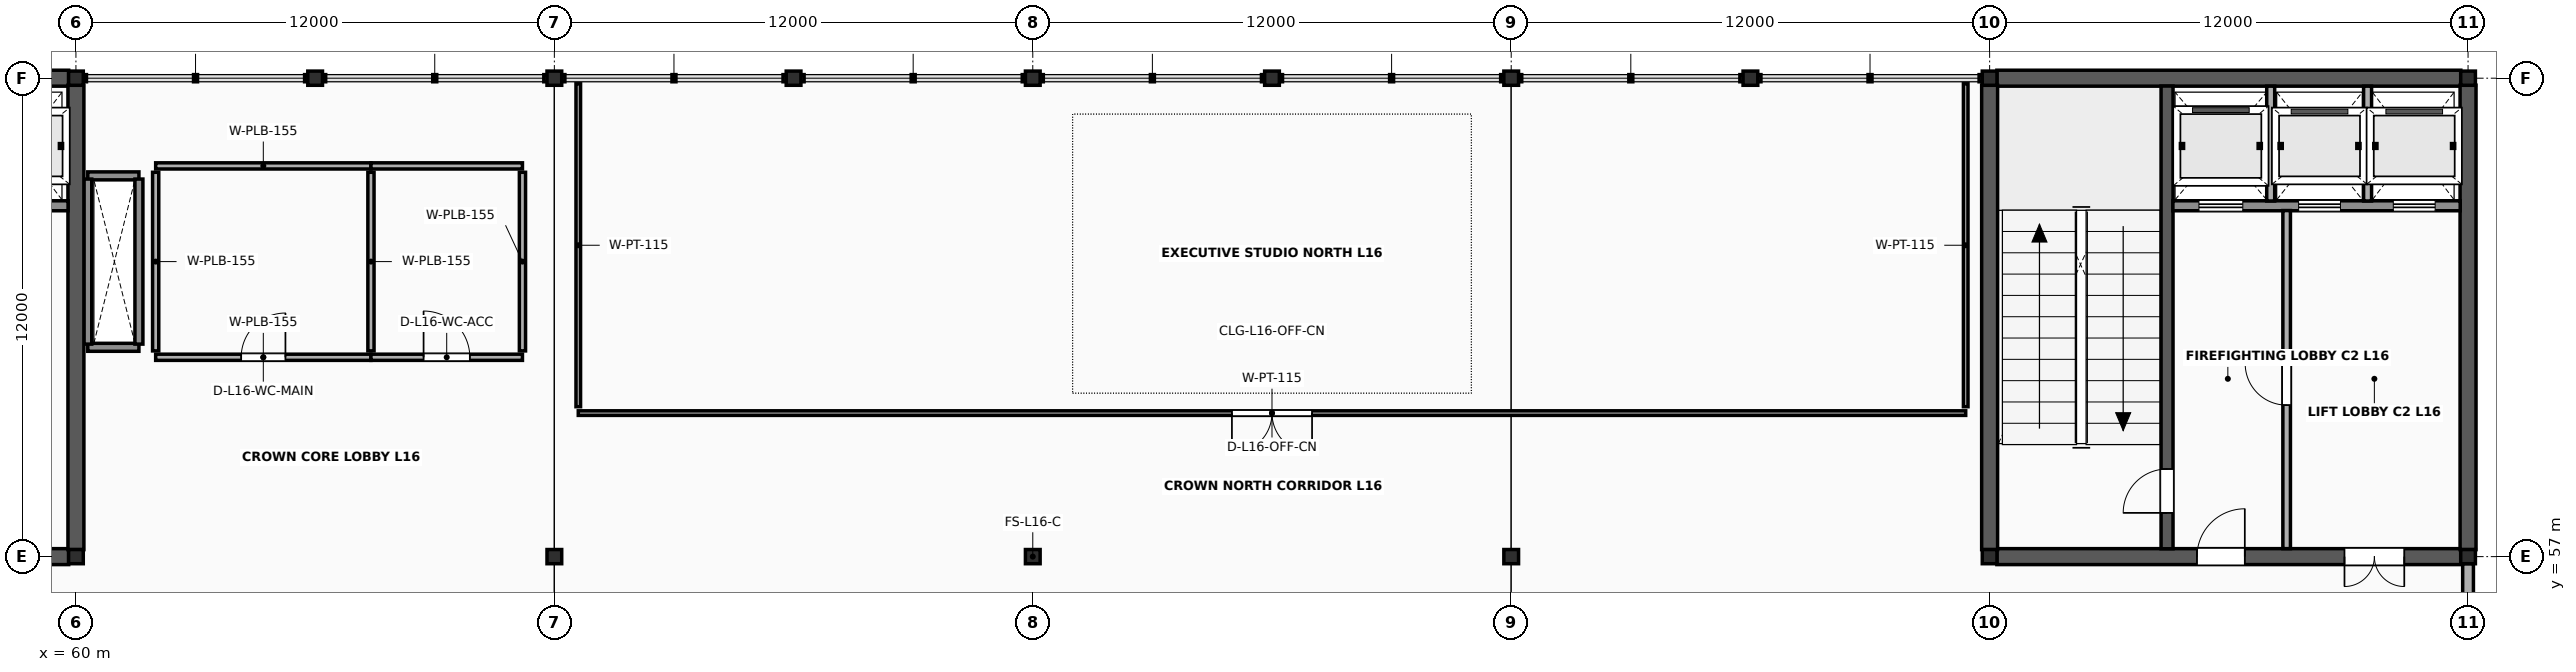
"""IFC4 building model, lengths in metres.
Left out: names, types, materials, properties, quantities, classifications, styles, units other than length and angle.
Written with IfcOpenShell. Run it as: python <this file> out.ifc"""

import sys

from ifc_helpers import new_model, si_unit, direction, frame, frame_2d, origin, origin_2d, place, context, subcontext, project, spatial, rectangle, i_section, extrude, element, fill, save


model = new_model("IFC4")
c1 = context("Model", 3, precision=1e-05, world=origin(), true_north=direction((0.0, 1.0)))
c2 = subcontext(c1, "Body", "Model", "MODEL_VIEW")
j1 = project(units=[si_unit("LENGTHUNIT", "METRE"), si_unit("PLANEANGLEUNIT", "RADIAN")], contexts=[c1])
p1 = place(None, origin())
s1 = spatial("IfcSite", under=j1, at=p1, CompositionType="ELEMENT")
p2 = place(p1, origin())
s2 = spatial("IfcBuilding", under=s1, at=p2, CompositionType="ELEMENT")
p3 = place(p2, frame((0.0, 0.0, 65.6)))
s3 = spatial("IfcBuildingStorey", under=s2, at=p3, CompositionType="ELEMENT", Elevation=65.6)
for number, where, z_axis, x_axis in (
    (1, (60.0, 57.0, 0.0), (0.0, 0.0, 1.0), (1.0, 0.0, 0.0)),
    (2, (60.0, 69.0, 0.0), (0.0, 0.0, 1.0), (1.0, 0.0, 0.0)),
    (3, (72.0, 57.0, 0.0), (0.0, 0.0, 1.0), (1.0, 0.0, 0.0)),
    (4, (72.0, 69.0, 0.0), (0.0, 0.0, 1.0), (1.0, 0.0, 0.0)),
    (5, (84.0, 57.0, 0.0), (0.0, 0.0, 1.0), (1.0, 0.0, 0.0)),
    (6, (84.0, 69.0, 0.0), (0.0, 0.0, 1.0), (1.0, 0.0, 0.0)),
    (7, (96.0, 57.0, 0.0), (0.0, 0.0, 1.0), (1.0, 0.0, 0.0)),
    (8, (96.0, 69.0, 0.0), (0.0, 0.0, 1.0), (1.0, 0.0, 0.0)),
    (9, (108.0, 57.0, 0.0), (0.0, 0.0, 1.0), (1.0, 0.0, 0.0)),
    (10, (108.0, 69.0, 0.0), (0.0, 0.0, 1.0), (1.0, 0.0, 0.0)),
    (11, (120.0, 57.0, 0.0), (0.0, 0.0, 1.0), (1.0, 0.0, 0.0)),
    (12, (120.0, 69.0, 0.0), (0.0, 0.0, 1.0), (1.0, 0.0, 0.0)),
    (13, (66.0, 69.0, 0.0), (0.0, 0.0, 1.0), (1.0, 0.0, 0.0)),
    (14, (78.0, 69.0, 0.0), (0.0, 0.0, 1.0), (1.0, 0.0, 0.0)),
    (15, (90.0, 69.0, 0.0), (0.0, 0.0, 1.0), (1.0, 0.0, 0.0)),
    (16, (102.0, 69.0, 0.0), (0.0, 0.0, 1.0), (1.0, 0.0, 0.0)),
):
    element("IfcColumn", number, at=place(p3, frame(where, z_axis=z_axis, x_axis=x_axis)), inside=s3, PredefinedType="COLUMN", context=c2, shape_type="SweptSolid", body=[
        extrude(i_section(OverallWidth=0.369, OverallDepth=0.356, WebThickness=0.011, FlangeThickness=0.018, FilletRadius=0.018, at=origin_2d()), origin(), (0.0, 0.0, 1.0), 4.0),
    ])
for number, where, z_axis, x_axis in (
    (17, (60.297, 62.25, 0.0), (0.0, 0.0, 1.0), (1.0, 0.0, 0.0)),
    (18, (60.297, 66.55, 0.0), (0.0, 0.0, 1.0), (1.0, 0.0, 0.0)),
):
    element("IfcWall", number, at=place(p3, frame(where, z_axis=z_axis, x_axis=x_axis)), inside=s3, PredefinedType="SOLIDWALL", context=c2, shape_type="SweptSolid", body=[
        extrude(rectangle(XDim=1.283, YDim=0.2, at=frame_2d((0.642, 0.0))), origin(), (0.0, 0.0, 1.0), 3.793),
    ])
for number, where, z_axis, x_axis in (
    (19, (60.297, 62.33, 0.0), (0.0, 0.0, 1.0), (0.0, 1.0, 0.0)),
    (20, (61.58, 62.33, 0.0), (0.0, 0.0, 1.0), (0.0, 1.0, 0.0)),
):
    element("IfcWall", number, at=place(p3, frame(where, z_axis=z_axis, x_axis=x_axis)), inside=s3, PredefinedType="SOLIDWALL", context=c2, shape_type="SweptSolid", body=[
        extrude(rectangle(XDim=4.14, YDim=0.2, at=frame_2d((2.07, 0.0))), origin(), (0.0, 0.0, 1.0), 3.793),
    ])
p4 = place(p3, frame((48.181, 57.0, 0.0), z_axis=(0.0, 0.0, 1.0), x_axis=(1.0, 0.0, 0.0)))
e21 = element("IfcWall", 21, at=p4, inside=s3, PredefinedType="SHEAR", context=c2, shape_type="SweptSolid", body=[
    extrude(rectangle(XDim=11.637, YDim=0.4, at=frame_2d((5.819, 0.0))), origin(), (0.0, 0.0, 1.0), 3.793),
])
p5 = place(p4, frame((5.019, 0.0, 0.0)))
e22 = element("IfcOpeningElement", 22, at=p5, cuts=e21, PredefinedType="OPENING", context=c2, shape_type="SweptSolid", body=[
    extrude(rectangle(XDim=1.2, YDim=2.2, at=frame_2d((0.6, 1.1))), frame((0.0, 0.215, 0.0), z_axis=(0.0, -1.0, 0.0), x_axis=(1.0, 0.0, 0.0)), (0.0, 0.0, 1.0), 0.43),
])
p6 = place(p4, frame((8.718, 0.0, 0.0)))
e23 = element("IfcOpeningElement", 23, at=p6, cuts=e21, PredefinedType="OPENING", context=c2, shape_type="SweptSolid", body=[
    extrude(rectangle(XDim=1.5, YDim=2.25, at=frame_2d((0.75, 1.125))), frame((0.0, 0.215, 0.0), z_axis=(0.0, -1.0, 0.0), x_axis=(1.0, 0.0, 0.0)), (0.0, 0.0, 1.0), 0.43),
])
p7 = place(p3, frame((48.181, 69.0, 0.0), z_axis=(0.0, 0.0, 1.0), x_axis=(1.0, 0.0, 0.0)))
e24 = element("IfcWall", 24, at=p7, inside=s3, PredefinedType="SHEAR", context=c2, shape_type="SweptSolid", body=[
    extrude(rectangle(XDim=11.637, YDim=0.4, at=frame_2d((5.819, 0.0))), origin(), (0.0, 0.0, 1.0), 3.793),
])
p8 = place(p3, frame((60.0, 57.175, 0.0), z_axis=(0.0, 0.0, 1.0), x_axis=(0.0, 1.0, 0.0)))
e25 = element("IfcWall", 25, at=p8, inside=s3, PredefinedType="SHEAR", context=c2, shape_type="SweptSolid", body=[
    extrude(rectangle(XDim=11.65, YDim=0.4, at=frame_2d((5.825, 0.0))), origin(), (0.0, 0.0, 1.0), 3.793),
])
p9 = place(p3, frame((52.597, 65.8, 0.0), z_axis=(0.0, 0.0, 1.0), x_axis=(1.0, 0.0, 0.0)))
e26 = element("IfcWall", 26, at=p9, inside=s3, PredefinedType="SOLIDWALL", context=c2, shape_type="SweptSolid", body=[
    extrude(rectangle(XDim=7.206, YDim=0.25, at=frame_2d((3.603, 0.0))), origin(), (0.0, 0.0, 1.0), 3.793),
])
p10 = place(p9, frame((0.653, 0.0, 0.0)))
e27 = element("IfcOpeningElement", 27, at=p10, cuts=e26, PredefinedType="OPENING", context=c2, shape_type="SweptSolid", body=[
    extrude(rectangle(XDim=1.1, YDim=2.24, at=frame_2d((0.55, 1.12))), frame((0.0, 0.14, 0.0), z_axis=(0.0, -1.0, 0.0), x_axis=(1.0, 0.0, 0.0)), (0.0, 0.0, 1.0), 0.28),
])
p11 = place(p9, frame((3.153, 0.0, 0.0)))
e28 = element("IfcOpeningElement", 28, at=p11, cuts=e26, PredefinedType="OPENING", context=c2, shape_type="SweptSolid", body=[
    extrude(rectangle(XDim=1.05, YDim=2.2, at=frame_2d((0.525, 1.1))), frame((0.0, 0.14, 0.0), z_axis=(0.0, -1.0, 0.0), x_axis=(1.0, 0.0, 0.0)), (0.0, 0.0, 1.0), 0.28),
])
p12 = place(p9, frame((5.528, 0.0, 0.0)))
e29 = element("IfcOpeningElement", 29, at=p12, cuts=e26, PredefinedType="OPENING", context=c2, shape_type="SweptSolid", body=[
    extrude(rectangle(XDim=1.05, YDim=2.2, at=frame_2d((0.525, 1.1))), frame((0.0, 0.14, 0.0), z_axis=(0.0, -1.0, 0.0), x_axis=(1.0, 0.0, 0.0)), (0.0, 0.0, 1.0), 0.28),
])
p13 = place(p3, frame((108.181, 57.0, 0.0), z_axis=(0.0, 0.0, 1.0), x_axis=(1.0, 0.0, 0.0)))
e30 = element("IfcWall", 30, at=p13, inside=s3, PredefinedType="SHEAR", context=c2, shape_type="SweptSolid", body=[
    extrude(rectangle(XDim=11.637, YDim=0.4, at=frame_2d((5.819, 0.0))), origin(), (0.0, 0.0, 1.0), 3.793),
])
p14 = place(p13, frame((5.019, 0.0, 0.0)))
e31 = element("IfcOpeningElement", 31, at=p14, cuts=e30, PredefinedType="OPENING", context=c2, shape_type="SweptSolid", body=[
    extrude(rectangle(XDim=1.2, YDim=2.2, at=frame_2d((0.6, 1.1))), frame((0.0, 0.215, 0.0), z_axis=(0.0, -1.0, 0.0), x_axis=(1.0, 0.0, 0.0)), (0.0, 0.0, 1.0), 0.43),
])
p15 = place(p13, frame((8.719, 0.0, 0.0)))
e32 = element("IfcOpeningElement", 32, at=p15, cuts=e30, PredefinedType="OPENING", context=c2, shape_type="SweptSolid", body=[
    extrude(rectangle(XDim=1.5, YDim=2.25, at=frame_2d((0.75, 1.125))), frame((0.0, 0.215, 0.0), z_axis=(0.0, -1.0, 0.0), x_axis=(1.0, 0.0, 0.0)), (0.0, 0.0, 1.0), 0.43),
])
p16 = place(p3, frame((108.181, 69.0, 0.0), z_axis=(0.0, 0.0, 1.0), x_axis=(1.0, 0.0, 0.0)))
e33 = element("IfcWall", 33, at=p16, inside=s3, PredefinedType="SHEAR", context=c2, shape_type="SweptSolid", body=[
    extrude(rectangle(XDim=11.637, YDim=0.4, at=frame_2d((5.819, 0.0))), origin(), (0.0, 0.0, 1.0), 3.793),
])
for number, where, z_axis, x_axis in (
    (34, (108.0, 57.175, 0.0), (0.0, 0.0, 1.0), (0.0, 1.0, 0.0)),
    (35, (120.0, 57.175, 0.0), (0.0, 0.0, 1.0), (0.0, 1.0, 0.0)),
):
    element("IfcWall", number, at=place(p3, frame(where, z_axis=z_axis, x_axis=x_axis)), inside=s3, PredefinedType="SHEAR", context=c2, shape_type="SweptSolid", body=[
        extrude(rectangle(XDim=11.65, YDim=0.4, at=frame_2d((5.825, 0.0))), origin(), (0.0, 0.0, 1.0), 3.793),
    ])
p17 = place(p3, frame((112.45, 57.197, 0.0), z_axis=(0.0, 0.0, 1.0), x_axis=(0.0, 1.0, 0.0)))
e36 = element("IfcWall", 36, at=p17, inside=s3, PredefinedType="SHEAR", context=c2, shape_type="SweptSolid", body=[
    extrude(rectangle(XDim=11.606, YDim=0.3, at=frame_2d((5.803, 0.0))), origin(), (0.0, 0.0, 1.0), 3.793),
])
p18 = place(p17, frame((0.9, 0.0, 0.0)))
e37 = element("IfcOpeningElement", 37, at=p18, cuts=e36, PredefinedType="OPENING", context=c2, shape_type="SweptSolid", body=[
    extrude(rectangle(XDim=1.1, YDim=2.2, at=frame_2d((0.55, 1.1))), frame((0.0, 0.165, 0.0), z_axis=(0.0, -1.0, 0.0), x_axis=(1.0, 0.0, 0.0)), (0.0, 0.0, 1.0), 0.33),
])
p19 = place(p3, frame((112.597, 65.8, 0.0), z_axis=(0.0, 0.0, 1.0), x_axis=(1.0, 0.0, 0.0)))
e38 = element("IfcWall", 38, at=p19, inside=s3, PredefinedType="SOLIDWALL", context=c2, shape_type="SweptSolid", body=[
    extrude(rectangle(XDim=7.206, YDim=0.25, at=frame_2d((3.603, 0.0))), origin(), (0.0, 0.0, 1.0), 3.793),
])
p20 = place(p19, frame((0.653, 0.0, 0.0)))
e39 = element("IfcOpeningElement", 39, at=p20, cuts=e38, PredefinedType="OPENING", context=c2, shape_type="SweptSolid", body=[
    extrude(rectangle(XDim=1.1, YDim=2.24, at=frame_2d((0.55, 1.12))), frame((0.0, 0.14, 0.0), z_axis=(0.0, -1.0, 0.0), x_axis=(1.0, 0.0, 0.0)), (0.0, 0.0, 1.0), 0.28),
])
p21 = place(p19, frame((3.153, 0.0, 0.0)))
e40 = element("IfcOpeningElement", 40, at=p21, cuts=e38, PredefinedType="OPENING", context=c2, shape_type="SweptSolid", body=[
    extrude(rectangle(XDim=1.05, YDim=2.2, at=frame_2d((0.525, 1.1))), frame((0.0, 0.14, 0.0), z_axis=(0.0, -1.0, 0.0), x_axis=(1.0, 0.0, 0.0)), (0.0, 0.0, 1.0), 0.28),
])
p22 = place(p19, frame((5.528, 0.0, 0.0)))
e41 = element("IfcOpeningElement", 41, at=p22, cuts=e38, PredefinedType="OPENING", context=c2, shape_type="SweptSolid", body=[
    extrude(rectangle(XDim=1.05, YDim=2.2, at=frame_2d((0.525, 1.1))), frame((0.0, 0.14, 0.0), z_axis=(0.0, -1.0, 0.0), x_axis=(1.0, 0.0, 0.0)), (0.0, 0.0, 1.0), 0.28),
])
for number, where, z_axis, x_axis in (
    (42, (115.05, 65.92, 0.0), (0.0, 0.0, 1.0), (0.0, 1.0, 0.0)),
    (43, (117.48, 65.92, 0.0), (0.0, 0.0, 1.0), (0.0, 1.0, 0.0)),
):
    element("IfcWall", number, at=place(p3, frame(where, z_axis=z_axis, x_axis=x_axis)), inside=s3, PredefinedType="SOLIDWALL", context=c2, shape_type="SweptSolid", body=[
        extrude(rectangle(XDim=2.88, YDim=0.2, at=frame_2d((1.44, 0.0))), origin(), (0.0, 0.0, 1.0), 3.783),
    ])
p23 = place(p3, frame((115.45, 57.2, 0.0), z_axis=(0.0, 0.0, 1.0), x_axis=(0.0, 1.0, 0.0)))
e44 = element("IfcWall", 44, at=p23, inside=s3, PredefinedType="SOLIDWALL", context=c2, shape_type="SweptSolid", body=[
    extrude(rectangle(XDim=8.48, YDim=0.19, at=frame_2d((4.24, 0.0))), origin(), (0.0, 0.0, 1.0), 3.783),
])
p24 = place(p23, frame((3.6, 0.0, 0.0)))
e45 = element("IfcOpeningElement", 45, at=p24, cuts=e44, PredefinedType="OPENING", context=c2, shape_type="SweptSolid", body=[
    extrude(rectangle(XDim=1.04, YDim=2.18, at=frame_2d((0.52, 1.09))), frame((0.0, 0.11, 0.0), z_axis=(0.0, -1.0, 0.0), x_axis=(1.0, 0.0, 0.0)), (0.0, 0.0, 1.0), 0.22),
])
p25 = place(p3, frame((120.0, 45.176, 0.0), z_axis=(0.0, 0.0, 1.0), x_axis=(0.0, 1.0, 0.0)))
e46 = element("IfcWall", 46, at=p25, inside=s3, PredefinedType="SOLIDWALL", context=c2, shape_type="SweptSolid", body=[
    extrude(rectangle(XDim=11.648, YDim=0.27, at=frame_2d((5.824, 0.0))), origin(), (0.0, 0.0, 1.0), 3.246),
])
p26 = place(p25, frame((4.699, 0.0, 1.4)))
e47 = element("IfcOpeningElement", 47, at=p26, cuts=e46, PredefinedType="OPENING", context=c2, shape_type="SweptSolid", body=[
    extrude(rectangle(XDim=2.25, YDim=0.88, at=frame_2d((1.125, 0.44))), frame((0.0, 0.15, 0.0), z_axis=(0.0, -1.0, 0.0), x_axis=(1.0, 0.0, 0.0)), (0.0, 0.0, 1.0), 0.3),
])
p27 = place(p3, frame((62.0, 62.0, 0.0), z_axis=(0.0, 0.0, 1.0), x_axis=(1.0, 0.0, 0.0)))
e48 = element("IfcWall", 48, at=p27, inside=s3, PredefinedType="PLUMBINGWALL", context=c2, shape_type="SweptSolid", body=[
    extrude(rectangle(XDim=5.4, YDim=0.155, at=frame_2d((2.7, 0.0))), origin(), (0.0, 0.0, 1.0), 2.88),
])
p28 = place(p27, frame((2.145, 0.0, 0.0)))
e49 = element("IfcOpeningElement", 49, at=p28, cuts=e48, PredefinedType="OPENING", context=c2, shape_type="SweptSolid", body=[
    extrude(rectangle(XDim=1.11, YDim=2.21, at=frame_2d((0.555, 1.105))), frame((0.0, 0.093, 0.0), z_axis=(0.0, -1.0, 0.0), x_axis=(1.0, 0.0, 0.0)), (0.0, 0.0, 1.0), 0.185),
])
p29 = place(p3, frame((62.0, 66.8, 0.0), z_axis=(0.0, 0.0, 1.0), x_axis=(1.0, 0.0, 0.0)))
e50 = element("IfcWall", 50, at=p29, inside=s3, PredefinedType="PLUMBINGWALL", context=c2, shape_type="SweptSolid", body=[
    extrude(rectangle(XDim=5.4, YDim=0.155, at=frame_2d((2.7, 0.0))), origin(), (0.0, 0.0, 1.0), 2.88),
])
for number, where, z_axis, x_axis in (
    (51, (62.0, 62.16, 0.0), (0.0, 0.0, 1.0), (0.0, 1.0, 0.0)),
    (52, (67.4, 62.16, 0.0), (0.0, 0.0, 1.0), (0.0, 1.0, 0.0)),
):
    element("IfcWall", number, at=place(p3, frame(where, z_axis=z_axis, x_axis=x_axis)), inside=s3, PredefinedType="PLUMBINGWALL", context=c2, shape_type="SweptSolid", body=[
        extrude(rectangle(XDim=4.48, YDim=0.155, at=frame_2d((2.24, 0.0))), origin(), (0.0, 0.0, 1.0), 2.88),
    ])
p30 = place(p3, frame((67.4, 62.0, 0.0), z_axis=(0.0, 0.0, 1.0), x_axis=(1.0, 0.0, 0.0)))
e53 = element("IfcWall", 53, at=p30, inside=s3, PredefinedType="PLUMBINGWALL", context=c2, shape_type="SweptSolid", body=[
    extrude(rectangle(XDim=3.8, YDim=0.155, at=frame_2d((1.9, 0.0))), origin(), (0.0, 0.0, 1.0), 2.88),
])
p31 = place(p30, frame((1.32, 0.0, 0.0)))
e54 = element("IfcOpeningElement", 54, at=p31, cuts=e53, PredefinedType="OPENING", context=c2, shape_type="SweptSolid", body=[
    extrude(rectangle(XDim=1.16, YDim=2.23, at=frame_2d((0.58, 1.115))), frame((0.0, 0.093, 0.0), z_axis=(0.0, -1.0, 0.0), x_axis=(1.0, 0.0, 0.0)), (0.0, 0.0, 1.0), 0.185),
])
p32 = place(p3, frame((67.4, 66.8, 0.0), z_axis=(0.0, 0.0, 1.0), x_axis=(1.0, 0.0, 0.0)))
e55 = element("IfcWall", 55, at=p32, inside=s3, PredefinedType="PLUMBINGWALL", context=c2, shape_type="SweptSolid", body=[
    extrude(rectangle(XDim=3.8, YDim=0.155, at=frame_2d((1.9, 0.0))), origin(), (0.0, 0.0, 1.0), 2.88),
])
p33 = place(p3, frame((71.2, 62.16, 0.0), z_axis=(0.0, 0.0, 1.0), x_axis=(0.0, 1.0, 0.0)))
e56 = element("IfcWall", 56, at=p33, inside=s3, PredefinedType="PLUMBINGWALL", context=c2, shape_type="SweptSolid", body=[
    extrude(rectangle(XDim=4.48, YDim=0.155, at=frame_2d((2.24, 0.0))), origin(), (0.0, 0.0, 1.0), 2.88),
])
p34 = place(p3, frame((72.6, 60.6, 0.0), z_axis=(0.0, 0.0, 1.0), x_axis=(1.0, 0.0, 0.0)))
e57 = element("IfcWall", 57, at=p34, inside=s3, PredefinedType="PARTITIONING", context=c2, shape_type="SweptSolid", body=[
    extrude(rectangle(XDim=34.8, YDim=0.115, at=frame_2d((17.4, 0.0))), origin(), (0.0, 0.0, 1.0), 2.88),
])
p35 = place(p34, frame((16.395, 0.0, 0.0)))
e58 = element("IfcOpeningElement", 58, at=p35, cuts=e57, PredefinedType="OPENING", context=c2, shape_type="SweptSolid", body=[
    extrude(rectangle(XDim=2.01, YDim=2.45, at=frame_2d((1.005, 1.225))), frame((0.0, 0.073, 0.0), z_axis=(0.0, -1.0, 0.0), x_axis=(1.0, 0.0, 0.0)), (0.0, 0.0, 1.0), 0.145),
])
for number, where, z_axis, x_axis in (
    (59, (72.6, 60.76, 0.0), (0.0, 0.0, 1.0), (0.0, 1.0, 0.0)),
    (60, (107.4, 60.76, 0.0), (0.0, 0.0, 1.0), (0.0, 1.0, 0.0)),
):
    element("IfcWall", number, at=place(p3, frame(where, z_axis=z_axis, x_axis=x_axis)), inside=s3, PredefinedType="PARTITIONING", context=c2, shape_type="SweptSolid", body=[
        extrude(rectangle(XDim=8.1, YDim=0.115, at=frame_2d((4.05, 0.0))), origin(), (0.0, 0.0, 1.0), 2.88),
    ])
p36 = place(p18, origin())
e61 = element("IfcDoor", 61, at=p36, inside=s3, OperationType="SINGLE_SWING_LEFT", PredefinedType="DOOR", context=c2, shape_type="SweptSolid", body=[
    extrude(rectangle(XDim=1.1, YDim=2.2, at=frame_2d((0.55, 1.1))), frame((0.0, 0.025, 0.0), z_axis=(0.0, -1.0, 0.0), x_axis=(1.0, 0.0, 0.0)), (0.0, 0.0, 1.0), 0.05),
])
fill(e37, e61)
p37 = place(p24, origin())
e62 = element("IfcDoor", 62, at=p37, inside=s3, OperationType="SINGLE_SWING_RIGHT", PredefinedType="DOOR", context=c2, shape_type="SweptSolid", body=[
    extrude(rectangle(XDim=1.04, YDim=2.18, at=frame_2d((0.52, 1.09))), frame((0.0, 0.025, 0.0), z_axis=(0.0, -1.0, 0.0), x_axis=(1.0, 0.0, 0.0)), (0.0, 0.0, 1.0), 0.05),
])
fill(e45, e62)
p38 = place(p14, origin())
e63 = element("IfcDoor", 63, at=p38, inside=s3, OperationType="SINGLE_SWING_RIGHT", PredefinedType="DOOR", context=c2, shape_type="SweptSolid", body=[
    extrude(rectangle(XDim=1.2, YDim=2.2, at=frame_2d((0.6, 1.1))), frame((0.0, 0.025, 0.0), z_axis=(0.0, -1.0, 0.0), x_axis=(1.0, 0.0, 0.0)), (0.0, 0.0, 1.0), 0.05),
])
fill(e31, e63)
p39 = place(p15, origin())
e64 = element("IfcDoor", 64, at=p39, inside=s3, OperationType="DOUBLE_DOOR_SINGLE_SWING", PredefinedType="DOOR", context=c2, shape_type="SweptSolid", body=[
    extrude(rectangle(XDim=1.5, YDim=2.25, at=frame_2d((0.75, 1.125))), frame((0.0, 0.025, 0.0), z_axis=(0.0, -1.0, 0.0), x_axis=(1.0, 0.0, 0.0)), (0.0, 0.0, 1.0), 0.05),
])
fill(e32, e64)
p40 = place(p20, origin())
e65 = element("IfcDoor", 65, at=p40, inside=s3, OperationType="SLIDING_TO_LEFT", PredefinedType="USERDEFINED", context=c2, shape_type="SweptSolid", body=[
    extrude(rectangle(XDim=1.1, YDim=2.24, at=frame_2d((0.55, 1.12))), frame((0.0, 0.025, 0.0), z_axis=(0.0, -1.0, 0.0), x_axis=(1.0, 0.0, 0.0)), (0.0, 0.0, 1.0), 0.05),
])
fill(e39, e65)
p41 = place(p21, origin())
e66 = element("IfcDoor", 66, at=p41, inside=s3, OperationType="SLIDING_TO_LEFT", PredefinedType="USERDEFINED", context=c2, shape_type="SweptSolid", body=[
    extrude(rectangle(XDim=1.05, YDim=2.2, at=frame_2d((0.525, 1.1))), frame((0.0, 0.025, 0.0), z_axis=(0.0, -1.0, 0.0), x_axis=(1.0, 0.0, 0.0)), (0.0, 0.0, 1.0), 0.05),
])
fill(e40, e66)
p42 = place(p22, origin())
e67 = element("IfcDoor", 67, at=p42, inside=s3, OperationType="SLIDING_TO_LEFT", PredefinedType="USERDEFINED", context=c2, shape_type="SweptSolid", body=[
    extrude(rectangle(XDim=1.05, YDim=2.2, at=frame_2d((0.525, 1.1))), frame((0.0, 0.025, 0.0), z_axis=(0.0, -1.0, 0.0), x_axis=(1.0, 0.0, 0.0)), (0.0, 0.0, 1.0), 0.05),
])
fill(e41, e67)
p43 = place(p28, origin())
e68 = element("IfcDoor", 68, at=p43, inside=s3, OperationType="SINGLE_SWING_RIGHT", PredefinedType="DOOR", context=c2, shape_type="SweptSolid", body=[
    extrude(rectangle(XDim=1.11, YDim=2.21, at=frame_2d((0.555, 1.105))), frame((0.0, 0.025, 0.0), z_axis=(0.0, -1.0, 0.0), x_axis=(1.0, 0.0, 0.0)), (0.0, 0.0, 1.0), 0.05),
])
fill(e49, e68)
p44 = place(p31, origin())
e69 = element("IfcDoor", 69, at=p44, inside=s3, OperationType="SINGLE_SWING_LEFT", PredefinedType="DOOR", context=c2, shape_type="SweptSolid", body=[
    extrude(rectangle(XDim=1.16, YDim=2.23, at=frame_2d((0.58, 1.115))), frame((0.0, 0.025, 0.0), z_axis=(0.0, -1.0, 0.0), x_axis=(1.0, 0.0, 0.0)), (0.0, 0.0, 1.0), 0.05),
])
fill(e54, e69)
p45 = place(p35, origin())
e70 = element("IfcDoor", 70, at=p45, inside=s3, OperationType="DOUBLE_DOOR_SINGLE_SWING", PredefinedType="DOOR", context=c2, shape_type="SweptSolid", body=[
    extrude(rectangle(XDim=2.01, YDim=2.45, at=frame_2d((1.005, 1.225))), frame((0.0, 0.025, 0.0), z_axis=(0.0, -1.0, 0.0), x_axis=(1.0, 0.0, 0.0)), (0.0, 0.0, 1.0), 0.05),
])
fill(e58, e70)
save(model, sys.argv[1])
